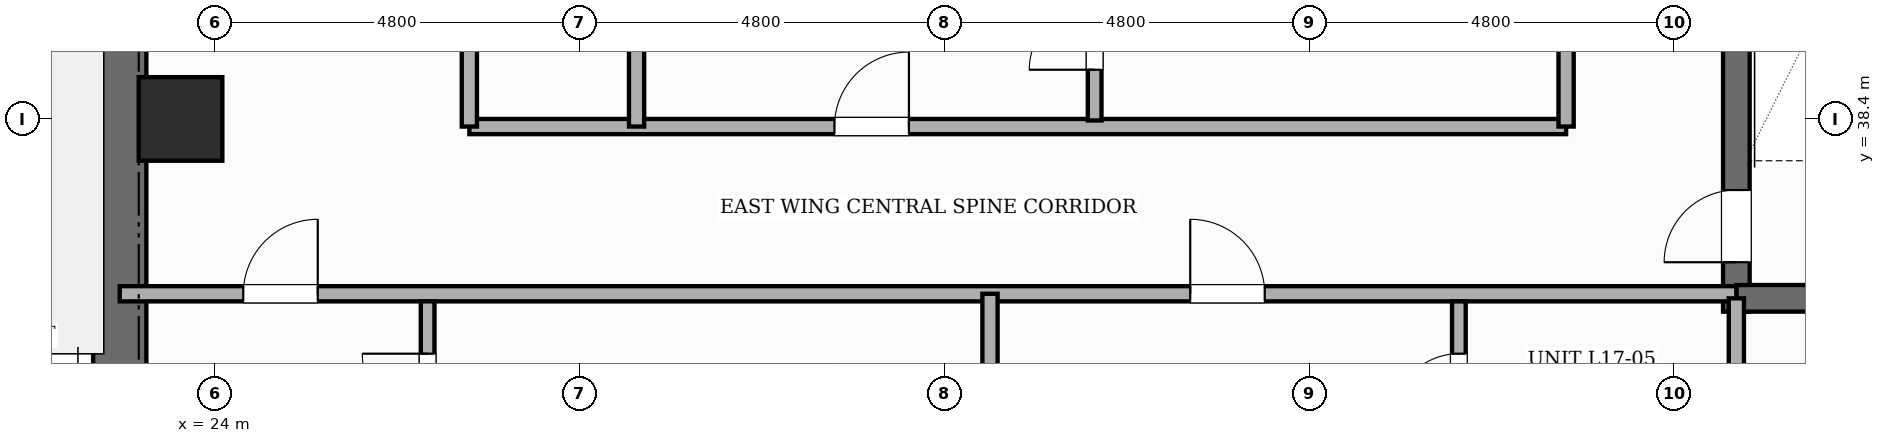
"""IFC4 building model, lengths in metres.
Left out: names, types, materials, properties, quantities, classifications, styles, units other than length and angle.
Written with IfcOpenShell. Run it as: python <this file> out.ifc"""

import sys

from ifc_helpers import new_model, si_unit, direction, frame, frame_2d, origin, origin_2d, place, context, subcontext, project, spatial, rectangle, extrude, element, fill, save


model = new_model("IFC4")
c1 = context("Model", 3, precision=1e-05, world=origin(), true_north=direction((0.0, 1.0)))
c2 = subcontext(c1, "Body", "Model", "MODEL_VIEW")
j1 = project(units=[si_unit("LENGTHUNIT", "METRE"), si_unit("PLANEANGLEUNIT", "RADIAN")], contexts=[c1])
p1 = place(None, origin())
s1 = spatial("IfcSite", under=j1, at=p1, CompositionType="ELEMENT")
p2 = place(p1, origin())
s2 = spatial("IfcBuilding", under=s1, at=p2, CompositionType="ELEMENT")
p3 = place(p2, frame((0.0, 0.0, 68.2)))
s3 = spatial("IfcBuildingStorey", under=s2, at=p3, CompositionType="ELEMENT", Elevation=68.2)
p4 = place(p3, frame((22.75, 30.55, 0.0), z_axis=(0.0, 0.0, 1.0), x_axis=(0.0, 1.0, 0.0)))
e1 = element("IfcWall", 1, at=p4, inside=s3, PredefinedType="SHEAR", context=c2, shape_type="SweptSolid", body=[
    extrude(rectangle(XDim=15.6, YDim=0.7, at=frame_2d((7.8, 0.0))), origin(), (0.0, 0.0, 1.0), 3.6),
])
p5 = place(p4, frame((10.8, 0.0, 0.0)))
e2 = element("IfcOpeningElement", 2, at=p5, cuts=e1, PredefinedType="OPENING", context=c2, shape_type="SweptSolid", body=[
    extrude(rectangle(XDim=1.0, YDim=2.15, at=frame_2d((0.5, 1.075))), frame((0.0, 0.36, 0.0), z_axis=(0.0, -1.0, 0.0), x_axis=(1.0, 0.0, 0.0)), (0.0, 0.0, 1.0), 0.72),
])
p6 = place(p3, frame((44.02, 35.865, 0.0), z_axis=(0.0, 0.0, 1.0), x_axis=(0.0, 1.0, 0.0)))
e3 = element("IfcWall", 3, at=p6, inside=s3, PredefinedType="SHEAR", context=c2, shape_type="SweptSolid", body=[
    extrude(rectangle(XDim=8.97, YDim=0.35, at=frame_2d((4.485, 0.0))), origin(), (0.0, 0.0, 1.0), 3.6),
])
p7 = place(p6, frame((0.65, 0.0, 0.0)))
e4 = element("IfcOpeningElement", 4, at=p7, cuts=e3, PredefinedType="OPENING", context=c2, shape_type="SweptSolid", body=[
    extrude(rectangle(XDim=0.95, YDim=2.1, at=frame_2d((0.475, 1.05))), frame((0.0, 0.185, 0.0), z_axis=(0.0, -1.0, 0.0), x_axis=(1.0, 0.0, 0.0)), (0.0, 0.0, 1.0), 0.37),
])
p8 = place(p3, frame((44.02, 36.04, 0.0), z_axis=(0.0, 0.0, 1.0), x_axis=(1.0, 0.0, 0.0)))
e5 = element("IfcWall", 5, at=p8, inside=s3, PredefinedType="SHEAR", context=c2, shape_type="SweptSolid", body=[
    extrude(rectangle(XDim=3.58, YDim=0.35, at=frame_2d((1.79, 0.0))), origin(), (0.0, 0.0, 1.0), 3.6),
])
p9 = place(p3, frame((23.55, 38.4, 0.0), z_axis=(0.0, 0.0, 1.0), x_axis=(1.0, 0.0, 0.0)))
e6 = element("IfcColumn", 6, at=p9, inside=s3, PredefinedType="COLUMN", context=c2, shape_type="SweptSolid", body=[
    extrude(rectangle(XDim=1.1, YDim=1.1, at=origin_2d()), origin(), (0.0, 0.0, 1.0), 3.6),
])
p10 = place(p3, frame((22.75, 36.1, 0.0), z_axis=(0.0, 0.0, 1.0), x_axis=(1.0, 0.0, 0.0)))
e7 = element("IfcWall", 7, at=p10, inside=s3, PredefinedType="PARTITIONING", context=c2, shape_type="SweptSolid", body=[
    extrude(rectangle(XDim=21.27, YDim=0.2, at=frame_2d((10.635, 0.0))), origin(), (0.0, 0.0, 1.0), 3.35),
])
p11 = place(p10, frame((1.625, 0.0, 0.0)))
e8 = element("IfcOpeningElement", 8, at=p11, cuts=e7, PredefinedType="OPENING", context=c2, shape_type="SweptSolid", body=[
    extrude(rectangle(XDim=0.98, YDim=2.18, at=frame_2d((0.49, 1.09))), frame((0.0, 0.11, 0.0), z_axis=(0.0, -1.0, 0.0), x_axis=(1.0, 0.0, 0.0)), (0.0, 0.0, 1.0), 0.22),
])
p12 = place(p10, frame((14.084, 0.0, 0.0)))
e9 = element("IfcOpeningElement", 9, at=p12, cuts=e7, PredefinedType="OPENING", context=c2, shape_type="SweptSolid", body=[
    extrude(rectangle(XDim=0.98, YDim=2.18, at=frame_2d((0.49, 1.09))), frame((0.0, 0.11, 0.0), z_axis=(0.0, -1.0, 0.0), x_axis=(1.0, 0.0, 0.0)), (0.0, 0.0, 1.0), 0.22),
])
p13 = place(p3, frame((27.35, 38.3, 0.0), z_axis=(0.0, 0.0, 1.0), x_axis=(1.0, 0.0, 0.0)))
e10 = element("IfcWall", 10, at=p13, inside=s3, PredefinedType="PARTITIONING", context=c2, shape_type="SweptSolid", body=[
    extrude(rectangle(XDim=14.43, YDim=0.2, at=frame_2d((7.215, 0.0))), origin(), (0.0, 0.0, 1.0), 3.35),
])
p14 = place(p13, frame((4.803, 0.0, 0.0)))
e11 = element("IfcOpeningElement", 11, at=p14, cuts=e10, PredefinedType="OPENING", context=c2, shape_type="SweptSolid", body=[
    extrude(rectangle(XDim=0.98, YDim=2.18, at=frame_2d((0.49, 1.09))), frame((0.0, 0.11, 0.0), z_axis=(0.0, -1.0, 0.0), x_axis=(1.0, 0.0, 0.0)), (0.0, 0.0, 1.0), 0.22),
])
p15 = place(p3, frame((27.35, 38.3, 0.0), z_axis=(0.0, 0.0, 1.0), x_axis=(0.0, 1.0, 0.0)))
e12 = element("IfcWall", 12, at=p15, inside=s3, PredefinedType="PARTITIONING", context=c2, shape_type="SweptSolid", body=[
    extrude(rectangle(XDim=9.38, YDim=0.2, at=frame_2d((4.69, 0.0))), origin(), (0.0, 0.0, 1.0), 3.35),
])
p16 = place(p15, frame((1.2, 0.0, 0.0)))
e13 = element("IfcOpeningElement", 13, at=p16, cuts=e12, PredefinedType="OPENING", context=c2, shape_type="SweptSolid", body=[
    extrude(rectangle(XDim=0.95, YDim=2.15, at=frame_2d((0.475, 1.075))), frame((0.0, 0.11, 0.0), z_axis=(0.0, -1.0, 0.0), x_axis=(1.0, 0.0, 0.0)), (0.0, 0.0, 1.0), 0.22),
])
p17 = place(p3, frame((29.55, 38.3, 0.0), z_axis=(0.0, 0.0, 1.0), x_axis=(0.0, 1.0, 0.0)))
e14 = element("IfcWall", 14, at=p17, inside=s3, PredefinedType="SOLIDWALL", context=c2, shape_type="SweptSolid", body=[
    extrude(rectangle(XDim=9.38, YDim=0.2, at=frame_2d((4.69, 0.0))), origin(), (0.0, 0.0, 1.0), 3.35),
])
p18 = place(p3, frame((26.801, 29.12, 0.0), z_axis=(0.0, 0.0, 1.0), x_axis=(0.0, 1.0, 0.0)))
e15 = element("IfcWall", 15, at=p18, inside=s3, PredefinedType="PLUMBINGWALL", context=c2, shape_type="SweptSolid", body=[
    extrude(rectangle(XDim=6.88, YDim=0.18, at=frame_2d((3.44, 0.0))), origin(), (0.0, 0.0, 1.0), 3.35),
])
p19 = place(p18, frame((0.617, 0.0, 0.0)))
e16 = element("IfcOpeningElement", 16, at=p19, cuts=e15, PredefinedType="OPENING", context=c2, shape_type="SweptSolid", body=[
    extrude(rectangle(XDim=0.9, YDim=2.15, at=frame_2d((0.45, 1.075))), frame((0.0, 0.1, 0.0), z_axis=(0.0, -1.0, 0.0), x_axis=(1.0, 0.0, 0.0)), (0.0, 0.0, 1.0), 0.2),
])
p20 = place(p18, frame((3.21, 0.0, 0.0)))
e17 = element("IfcOpeningElement", 17, at=p20, cuts=e15, PredefinedType="OPENING", context=c2, shape_type="SweptSolid", body=[
    extrude(rectangle(XDim=0.9, YDim=2.15, at=frame_2d((0.45, 1.075))), frame((0.0, 0.1, 0.0), z_axis=(0.0, -1.0, 0.0), x_axis=(1.0, 0.0, 0.0)), (0.0, 0.0, 1.0), 0.2),
])
p21 = place(p18, frame((5.332, 0.0, 0.0)))
e18 = element("IfcOpeningElement", 18, at=p21, cuts=e15, PredefinedType="OPENING", context=c2, shape_type="SweptSolid", body=[
    extrude(rectangle(XDim=0.86, YDim=2.1, at=frame_2d((0.43, 1.05))), frame((0.0, 0.1, 0.0), z_axis=(0.0, -1.0, 0.0), x_axis=(1.0, 0.0, 0.0)), (0.0, 0.0, 1.0), 0.2),
])
p22 = place(p3, frame((34.2, 29.12, 0.0), z_axis=(0.0, 0.0, 1.0), x_axis=(0.0, 1.0, 0.0)))
e19 = element("IfcWall", 19, at=p22, inside=s3, PredefinedType="SOLIDWALL", context=c2, shape_type="SweptSolid", body=[
    extrude(rectangle(XDim=6.98, YDim=0.2, at=frame_2d((3.49, 0.0))), origin(), (0.0, 0.0, 1.0), 3.35),
])
p23 = place(p3, frame((40.369, 29.12, 0.0), z_axis=(0.0, 0.0, 1.0), x_axis=(0.0, 1.0, 0.0)))
e20 = element("IfcWall", 20, at=p23, inside=s3, PredefinedType="PLUMBINGWALL", context=c2, shape_type="SweptSolid", body=[
    extrude(rectangle(XDim=6.88, YDim=0.18, at=frame_2d((3.44, 0.0))), origin(), (0.0, 0.0, 1.0), 3.35),
])
p24 = place(p23, frame((0.617, 0.0, 0.0)))
e21 = element("IfcOpeningElement", 21, at=p24, cuts=e20, PredefinedType="OPENING", context=c2, shape_type="SweptSolid", body=[
    extrude(rectangle(XDim=0.9, YDim=2.15, at=frame_2d((0.45, 1.075))), frame((0.0, 0.1, 0.0), z_axis=(0.0, -1.0, 0.0), x_axis=(1.0, 0.0, 0.0)), (0.0, 0.0, 1.0), 0.2),
])
p25 = place(p23, frame((3.21, 0.0, 0.0)))
e22 = element("IfcOpeningElement", 22, at=p25, cuts=e20, PredefinedType="OPENING", context=c2, shape_type="SweptSolid", body=[
    extrude(rectangle(XDim=0.9, YDim=2.15, at=frame_2d((0.45, 1.075))), frame((0.0, 0.1, 0.0), z_axis=(0.0, -1.0, 0.0), x_axis=(1.0, 0.0, 0.0)), (0.0, 0.0, 1.0), 0.2),
])
p26 = place(p23, frame((5.332, 0.0, 0.0)))
e23 = element("IfcOpeningElement", 23, at=p26, cuts=e20, PredefinedType="OPENING", context=c2, shape_type="SweptSolid", body=[
    extrude(rectangle(XDim=0.86, YDim=2.1, at=frame_2d((0.43, 1.05))), frame((0.0, 0.1, 0.0), z_axis=(0.0, -1.0, 0.0), x_axis=(1.0, 0.0, 0.0)), (0.0, 0.0, 1.0), 0.2),
])
p27 = place(p3, frame((35.577, 38.38, 0.0), z_axis=(0.0, 0.0, 1.0), x_axis=(0.0, 1.0, 0.0)))
e24 = element("IfcWall", 24, at=p27, inside=s3, PredefinedType="PLUMBINGWALL", context=c2, shape_type="SweptSolid", body=[
    extrude(rectangle(XDim=9.3, YDim=0.18, at=frame_2d((4.65, 0.0))), origin(), (0.0, 0.0, 1.0), 3.35),
])
p28 = place(p27, frame((0.667, 0.0, 0.0)))
e25 = element("IfcOpeningElement", 25, at=p28, cuts=e24, PredefinedType="OPENING", context=c2, shape_type="SweptSolid", body=[
    extrude(rectangle(XDim=0.86, YDim=2.1, at=frame_2d((0.43, 1.05))), frame((0.0, 0.1, 0.0), z_axis=(0.0, -1.0, 0.0), x_axis=(1.0, 0.0, 0.0)), (0.0, 0.0, 1.0), 0.2),
])
p29 = place(p27, frame((3.43, 0.0, 0.0)))
e26 = element("IfcOpeningElement", 26, at=p29, cuts=e24, PredefinedType="OPENING", context=c2, shape_type="SweptSolid", body=[
    extrude(rectangle(XDim=0.9, YDim=2.15, at=frame_2d((0.45, 1.075))), frame((0.0, 0.1, 0.0), z_axis=(0.0, -1.0, 0.0), x_axis=(1.0, 0.0, 0.0)), (0.0, 0.0, 1.0), 0.2),
])
p30 = place(p27, frame((6.828, 0.0, 0.0)))
e27 = element("IfcOpeningElement", 27, at=p30, cuts=e24, PredefinedType="OPENING", context=c2, shape_type="SweptSolid", body=[
    extrude(rectangle(XDim=0.9, YDim=2.15, at=frame_2d((0.45, 1.075))), frame((0.0, 0.1, 0.0), z_axis=(0.0, -1.0, 0.0), x_axis=(1.0, 0.0, 0.0)), (0.0, 0.0, 1.0), 0.2),
])
p31 = place(p3, frame((41.78, 38.3, 0.0), z_axis=(0.0, 0.0, 1.0), x_axis=(0.0, 1.0, 0.0)))
e28 = element("IfcWall", 28, at=p31, inside=s3, PredefinedType="PARTITIONING", context=c2, shape_type="SweptSolid", body=[
    extrude(rectangle(XDim=9.38, YDim=0.2, at=frame_2d((4.69, 0.0))), origin(), (0.0, 0.0, 1.0), 3.35),
])
p32 = place(p3, frame((44.02, 29.12, 0.0), z_axis=(0.0, 0.0, 1.0), x_axis=(0.0, 1.0, 0.0)))
e29 = element("IfcWall", 29, at=p32, inside=s3, PredefinedType="SOLIDWALL", context=c2, shape_type="SweptSolid", body=[
    extrude(rectangle(XDim=6.92, YDim=0.2, at=frame_2d((3.46, 0.0))), origin(), (0.0, 0.0, 1.0), 3.35),
])
p33 = place(p7, origin())
e30 = element("IfcDoor", 30, at=p33, inside=s3, OperationType="SINGLE_SWING_LEFT", PredefinedType="DOOR", context=c2, shape_type="SweptSolid", body=[
    extrude(rectangle(XDim=0.95, YDim=2.1, at=frame_2d((0.475, 1.05))), frame((0.0, 0.025, 0.0), z_axis=(0.0, -1.0, 0.0), x_axis=(1.0, 0.0, 0.0)), (0.0, 0.0, 1.0), 0.05),
])
fill(e4, e30)
p34 = place(p11, origin())
e31 = element("IfcDoor", 31, at=p34, inside=s3, OperationType="SINGLE_SWING_RIGHT", PredefinedType="DOOR", context=c2, shape_type="SweptSolid", body=[
    extrude(rectangle(XDim=0.98, YDim=2.18, at=frame_2d((0.49, 1.09))), frame((0.0, 0.025, 0.0), z_axis=(0.0, -1.0, 0.0), x_axis=(1.0, 0.0, 0.0)), (0.0, 0.0, 1.0), 0.05),
])
fill(e8, e31)
p35 = place(p21, origin())
e32 = element("IfcDoor", 32, at=p35, inside=s3, OperationType="SINGLE_SWING_RIGHT", PredefinedType="DOOR", context=c2, shape_type="SweptSolid", body=[
    extrude(rectangle(XDim=0.86, YDim=2.1, at=frame_2d((0.43, 1.05))), frame((0.0, 0.025, 0.0), z_axis=(0.0, -1.0, 0.0), x_axis=(1.0, 0.0, 0.0)), (0.0, 0.0, 1.0), 0.05),
])
fill(e18, e32)
p36 = place(p12, origin())
e33 = element("IfcDoor", 33, at=p36, inside=s3, OperationType="SINGLE_SWING_LEFT", PredefinedType="DOOR", context=c2, shape_type="SweptSolid", body=[
    extrude(rectangle(XDim=0.98, YDim=2.18, at=frame_2d((0.49, 1.09))), frame((0.0, 0.025, 0.0), z_axis=(0.0, -1.0, 0.0), x_axis=(1.0, 0.0, 0.0)), (0.0, 0.0, 1.0), 0.05),
])
fill(e9, e33)
p37 = place(p26, origin())
e34 = element("IfcDoor", 34, at=p37, inside=s3, OperationType="SINGLE_SWING_LEFT", PredefinedType="DOOR", context=c2, shape_type="SweptSolid", body=[
    extrude(rectangle(XDim=0.86, YDim=2.1, at=frame_2d((0.43, 1.05))), frame((0.0, 0.025, 0.0), z_axis=(0.0, -1.0, 0.0), x_axis=(1.0, 0.0, 0.0)), (0.0, 0.0, 1.0), 0.05),
])
fill(e23, e34)
p38 = place(p14, origin())
e35 = element("IfcDoor", 35, at=p38, inside=s3, OperationType="SINGLE_SWING_RIGHT", PredefinedType="DOOR", context=c2, shape_type="SweptSolid", body=[
    extrude(rectangle(XDim=0.98, YDim=2.18, at=frame_2d((0.49, 1.09))), frame((0.0, 0.025, 0.0), z_axis=(0.0, -1.0, 0.0), x_axis=(1.0, 0.0, 0.0)), (0.0, 0.0, 1.0), 0.05),
])
fill(e11, e35)
p39 = place(p28, origin())
e36 = element("IfcDoor", 36, at=p39, inside=s3, OperationType="SINGLE_SWING_LEFT", PredefinedType="DOOR", context=c2, shape_type="SweptSolid", body=[
    extrude(rectangle(XDim=0.86, YDim=2.1, at=frame_2d((0.43, 1.05))), frame((0.0, 0.025, 0.0), z_axis=(0.0, -1.0, 0.0), x_axis=(1.0, 0.0, 0.0)), (0.0, 0.0, 1.0), 0.05),
])
fill(e25, e36)
save(model, sys.argv[1])
